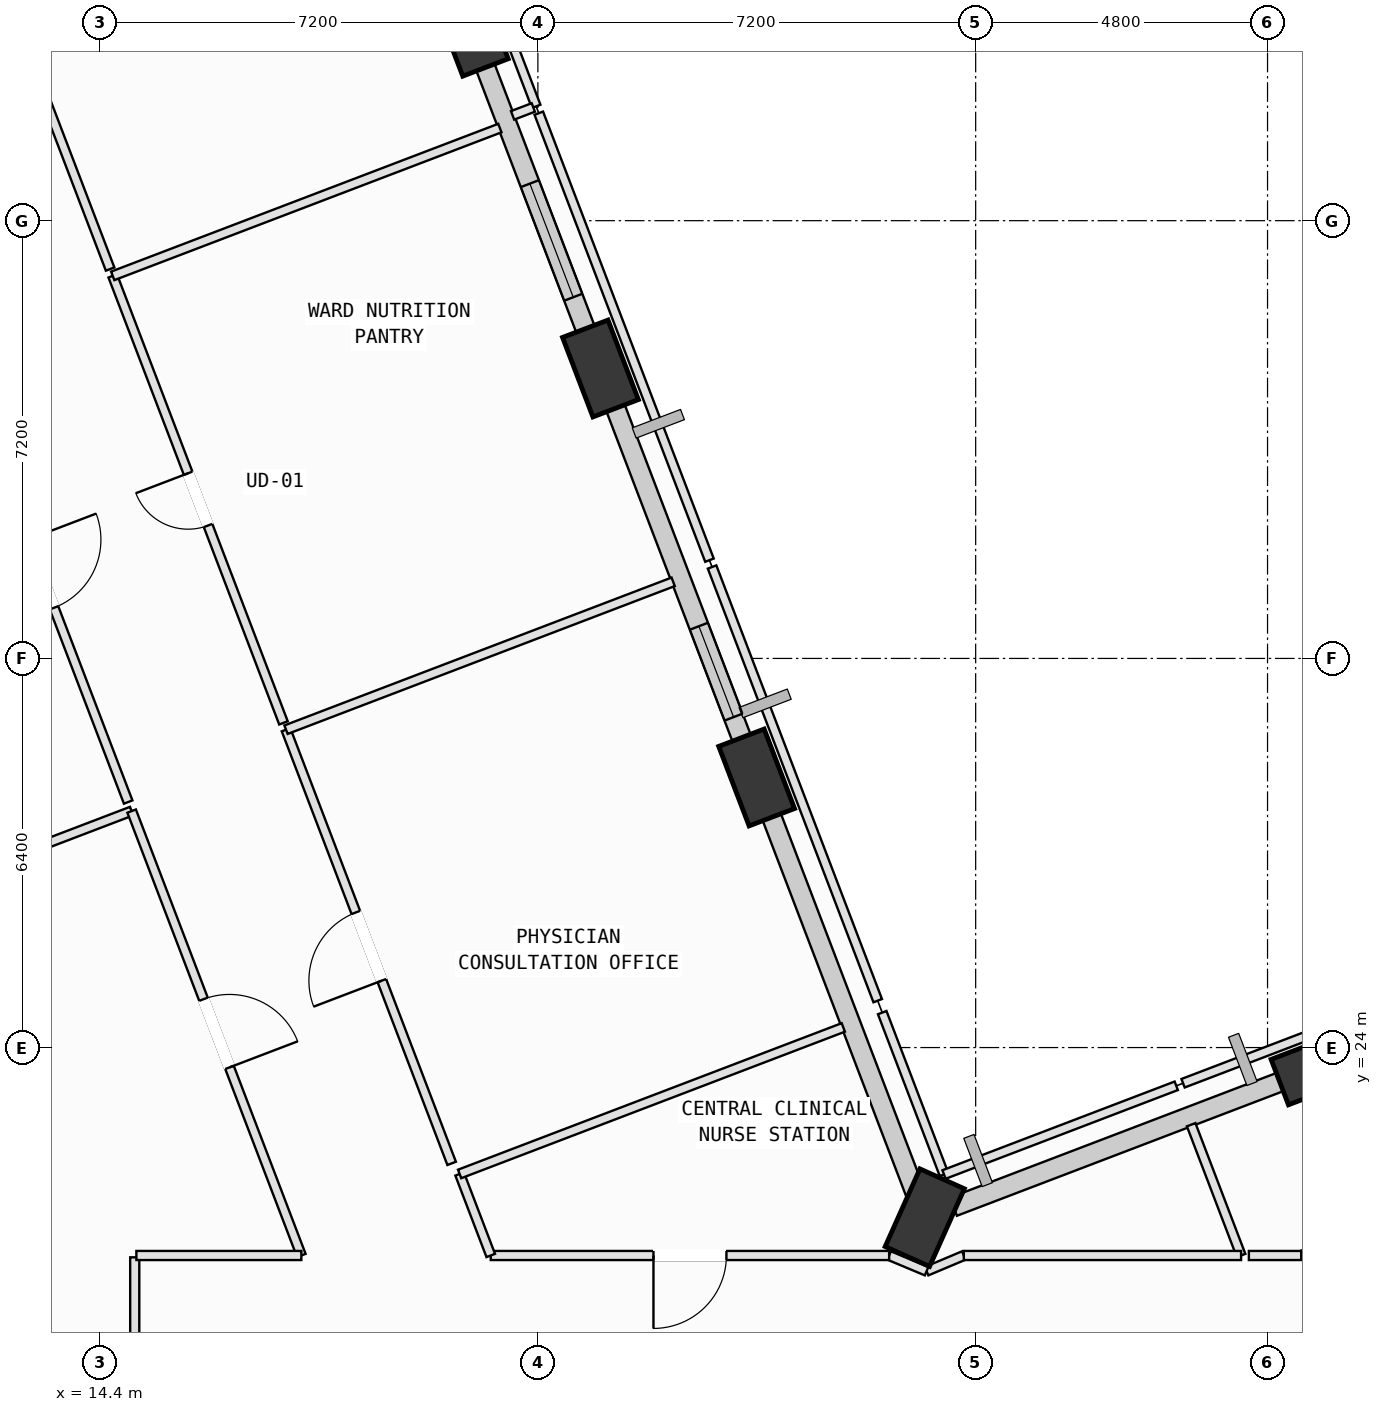
"""IFC4 building model, lengths in metres.
Left out: names, types, materials, properties, quantities, classifications, styles, units other than length and angle.
Written with IfcOpenShell. Run it as: python <this file> out.ifc"""

import sys

from ifc_helpers import new_model, si_unit, direction, frame, frame_2d, origin, origin_2d, place, context, subcontext, project, spatial, rectangle, extrude, element, fill, save


model = new_model("IFC4")
c1 = context("Model", 3, precision=1e-05, world=origin(), true_north=direction((0.0, 1.0)))
c2 = subcontext(c1, "Body", "Model", "MODEL_VIEW")
j1 = project(units=[si_unit("LENGTHUNIT", "METRE"), si_unit("PLANEANGLEUNIT", "RADIAN")], contexts=[c1])
p1 = place(None, origin())
s1 = spatial("IfcSite", under=j1, at=p1, CompositionType="ELEMENT")
p2 = place(p1, origin())
s2 = spatial("IfcBuilding", under=s1, at=p2, CompositionType="ELEMENT")
p3 = place(p2, frame((0.0, 0.0, 112.4)))
s3 = spatial("IfcBuildingStorey", under=s2, at=p3, CompositionType="ELEMENT", Elevation=112.4)
p4 = place(p3, frame((34.455, 23.682, 0.002), z_axis=(0.004581754657, 0.003543223601, 0.999983226405), x_axis=(-0.853691308844, 0.52077526819, 0.002066215567)))
e1 = element("IfcColumn", 1, at=p4, inside=s3, PredefinedType="COLUMN", context=c2, shape_type="SweptSolid", body=[
    extrude(rectangle(XDim=1.4, YDim=0.8, at=origin_2d()), origin(), (0.0, 0.0, 1.0), 3.996),
])
p5 = place(p3, frame((27.963, 21.202, 0.002), z_axis=(0.015083717876, -0.023205719809, 0.999616914634), x_axis=(-0.154931345932, 0.987602134532, 0.025264637642)))
e2 = element("IfcColumn", 2, at=p5, inside=s3, PredefinedType="COLUMN", context=c2, shape_type="SweptSolid", body=[
    extrude(rectangle(XDim=1.4, YDim=0.8, at=origin_2d()), origin(), (0.0, 0.0, 1.0), 3.998),
])
p6 = place(p3, frame((25.198, 28.442, 0.002), z_axis=(-0.014773412501, -0.034918975002, 0.999280947215), x_axis=(0.035197670554, 0.998752464752, 0.035420871532)))
e3 = element("IfcColumn", 3, at=p6, inside=s3, PredefinedType="COLUMN", context=c2, shape_type="SweptSolid", body=[
    extrude(rectangle(XDim=1.4, YDim=0.8, at=origin_2d()), origin(), (0.0, 0.0, 1.0), 3.999),
])
p7 = place(p3, frame((22.629, 35.168, 0.002), z_axis=(-0.042497434841, -0.045728947103, 0.998049513516), x_axis=(0.373403967299, 0.925833824237, 0.058319868861)))
e4 = element("IfcColumn", 4, at=p7, inside=s3, PredefinedType="COLUMN", context=c2, shape_type="SweptSolid", body=[
    extrude(rectangle(XDim=1.4, YDim=0.8, at=origin_2d()), origin(), (0.0, 0.0, 1.0), 4.004),
])
p8 = place(p3, frame((20.489, 40.774, 0.002), z_axis=(-0.065494174518, -0.054720504546, 0.996351433725), x_axis=(0.485566626564, 0.870556249889, 0.079729962663)))
e5 = element("IfcColumn", 5, at=p8, inside=s3, PredefinedType="COLUMN", context=c2, shape_type="SweptSolid", body=[
    extrude(rectangle(XDim=1.4, YDim=0.8, at=origin_2d()), origin(), (0.0, 0.0, 1.0), 4.011),
])
p9 = place(p3, frame((28.434, 21.382, 0.0), z_axis=(0.0, 0.0, 1.0), x_axis=(0.934206473055, 0.356732765109, 0.0)))
e6 = element("IfcWall", 6, at=p9, inside=s3, PredefinedType="SOLIDWALL", context=c2, shape_type="SweptSolid", body=[
    extrude(rectangle(XDim=5.96, YDim=0.32, at=frame_2d((2.98, 0.0))), origin(), (0.0, 0.0, 1.0), 3.165),
])
p10 = place(p3, frame((25.393, 27.93, 0.0), z_axis=(0.0, 0.0, 1.0), x_axis=(0.35674913221, -0.934200223008, 0.0)))
e7 = element("IfcWall", 7, at=p10, inside=s3, PredefinedType="SOLIDWALL", context=c2, shape_type="SweptSolid", body=[
    extrude(rectangle(XDim=6.76, YDim=0.32, at=frame_2d((3.38, 0.0))), origin(), (0.0, 0.0, 1.0), 3.165),
])
p11 = place(p3, frame((22.822, 34.665, 0.0), z_axis=(0.0, 0.0, 1.0), x_axis=(0.356719620657, -0.934211492243, 0.0)))
e8 = element("IfcWall", 8, at=p11, inside=s3, PredefinedType="SOLIDWALL", context=c2, shape_type="SweptSolid", body=[
    extrude(rectangle(XDim=6.223, YDim=0.32, at=frame_2d((3.111, 0.0))), origin(), (0.0, 0.0, 1.0), 3.165),
])
p12 = place(p11, frame((3.999, 0.0, 0.75)))
e9 = element("IfcOpeningElement", 9, at=p12, cuts=e8, PredefinedType="OPENING", context=c2, shape_type="SweptSolid", body=[
    extrude(rectangle(XDim=1.6, YDim=1.95, at=frame_2d((0.8, 0.975))), frame((0.0, 0.17, 0.0), z_axis=(0.0, -1.0, 0.0), x_axis=(1.0, 0.0, 0.0)), (0.0, 0.0, 1.0), 0.34),
])
p13 = place(p3, frame((20.676, 40.284, 0.0), z_axis=(0.0, 0.0, 1.0), x_axis=(0.356741479656, -0.934203145302, 0.0)))
e10 = element("IfcWall", 10, at=p13, inside=s3, PredefinedType="SOLIDWALL", context=c2, shape_type="SweptSolid", body=[
    extrude(rectangle(XDim=5.047, YDim=0.32, at=frame_2d((2.523, 0.0))), origin(), (0.0, 0.0, 1.0), 3.165),
])
p14 = place(p13, frame((2.221, 0.0, 0.75)))
e11 = element("IfcOpeningElement", 11, at=p14, cuts=e10, PredefinedType="OPENING", context=c2, shape_type="SweptSolid", body=[
    extrude(rectangle(XDim=2.0, YDim=1.95, at=frame_2d((1.0, 0.975))), frame((0.0, 0.17, 0.0), z_axis=(0.0, -1.0, 0.0), x_axis=(1.0, 0.0, 0.0)), (0.0, 0.0, 1.0), 0.34),
])
p15 = place(p3, frame((14.97, 20.55, 0.0), z_axis=(0.0, 0.0, 1.0), x_axis=(0.0, -1.0, 0.0)))
e12 = element("IfcWall", 12, at=p15, inside=s3, PredefinedType="PARTITIONING", context=c2, shape_type="SweptSolid", body=[
    extrude(rectangle(XDim=1.248, YDim=0.15, at=frame_2d((0.624, 0.0))), origin(), (0.0, 0.0, 1.0), 3.78),
])
p16 = place(p3, frame((4.675, 23.977, 0.0), z_axis=(0.0, 0.0, 1.0), x_axis=(0.934201387947, 0.356746081629, 0.0)))
e13 = element("IfcWall", 13, at=p16, inside=s3, PredefinedType="PARTITIONING", context=c2, shape_type="SweptSolid", body=[
    extrude(rectangle(XDim=10.965, YDim=0.15, at=frame_2d((5.483, 0.0))), origin(), (0.0, 0.0, 1.0), 3.78),
])
p17 = place(p3, frame((14.919, 27.889, 0.0), z_axis=(0.0, 0.0, 1.0), x_axis=(0.356742665593, -0.934202692431, 0.0)))
e14 = element("IfcWall", 14, at=p17, inside=s3, PredefinedType="PARTITIONING", context=c2, shape_type="SweptSolid", body=[
    extrude(rectangle(XDim=7.824, YDim=0.15, at=frame_2d((3.912, 0.0))), origin(), (0.0, 0.0, 1.0), 3.78),
])
p18 = place(p17, frame((3.312, 0.0, 0.0)))
e15 = element("IfcOpeningElement", 15, at=p18, cuts=e14, PredefinedType="OPENING", context=c2, shape_type="SweptSolid", body=[
    extrude(rectangle(XDim=1.2, YDim=2.15, at=frame_2d((0.6, 1.075))), frame((0.0, 0.085, 0.0), z_axis=(0.0, -1.0, 0.0), x_axis=(1.0, 0.0, 0.0)), (0.0, 0.0, 1.0), 0.17),
])
p19 = place(p3, frame((17.71, 20.58, 0.0), z_axis=(0.0, 0.0, 1.0), x_axis=(-1.0, 0.0, 0.0)))
e16 = element("IfcWall", 16, at=p19, inside=s3, PredefinedType="PARTITIONING", context=c2, shape_type="SweptSolid", body=[
    extrude(rectangle(XDim=2.713, YDim=0.15, at=frame_2d((1.356, 0.0))), origin(), (0.0, 0.0, 1.0), 3.78),
])
p20 = place(p3, frame((11.994, 35.549, 0.0), z_axis=(0.0, 0.0, 1.0), x_axis=(0.356737704726, -0.934204586815, 0.0)))
e17 = element("IfcWall", 17, at=p20, inside=s3, PredefinedType="PARTITIONING", context=c2, shape_type="SweptSolid", body=[
    extrude(rectangle(XDim=8.04, YDim=0.15, at=frame_2d((4.02, 0.0))), origin(), (0.0, 0.0, 1.0), 3.78),
])
p21 = place(p20, frame((3.42, 0.0, 0.0)))
e18 = element("IfcOpeningElement", 18, at=p21, cuts=e17, PredefinedType="OPENING", context=c2, shape_type="SweptSolid", body=[
    extrude(rectangle(XDim=1.2, YDim=2.15, at=frame_2d((0.6, 1.075))), frame((0.0, 0.085, 0.0), z_axis=(0.0, -1.0, 0.0), x_axis=(1.0, 0.0, 0.0)), (0.0, 0.0, 1.0), 0.17),
])
p22 = place(p3, frame((28.605, 20.58, 0.0), z_axis=(0.0, 0.0, 1.0), x_axis=(-0.921448466348, -0.388500609864, 0.0)))
e19 = element("IfcWall", 19, at=p22, inside=s3, PredefinedType="PARTITIONING", context=c2, shape_type="SweptSolid", body=[
    extrude(rectangle(XDim=0.664, YDim=0.15, at=frame_2d((0.332, 0.0))), origin(), (0.0, 0.0, 1.0), 3.78),
])
p23 = place(p3, frame((27.993, 20.322, 0.0), z_axis=(0.0, 0.0, 1.0), x_axis=(-0.922328906897, 0.386405729128, 0.0)))
e20 = element("IfcWall", 20, at=p23, inside=s3, PredefinedType="PARTITIONING", context=c2, shape_type="SweptSolid", body=[
    extrude(rectangle(XDim=0.668, YDim=0.15, at=frame_2d((0.334, 0.0))), origin(), (0.0, 0.0, 1.0), 3.78),
])
p24 = place(p3, frame((27.377, 20.58, 0.0), z_axis=(0.0, 0.0, 1.0), x_axis=(-1.0, 0.0, 0.0)))
e21 = element("IfcWall", 21, at=p24, inside=s3, PredefinedType="PARTITIONING", context=c2, shape_type="SweptSolid", body=[
    extrude(rectangle(XDim=6.552, YDim=0.15, at=frame_2d((3.276, 0.0))), origin(), (0.0, 0.0, 1.0), 3.78),
])
p25 = place(p24, frame((2.676, 0.0, 0.0)))
e22 = element("IfcOpeningElement", 22, at=p25, cuts=e21, PredefinedType="OPENING", context=c2, shape_type="SweptSolid", body=[
    extrude(rectangle(XDim=1.2, YDim=2.15, at=frame_2d((0.6, 1.075))), frame((0.0, 0.085, 0.0), z_axis=(0.0, -1.0, 0.0), x_axis=(1.0, 0.0, 0.0)), (0.0, 0.0, 1.0), 0.17),
])
p26 = place(p3, frame((20.825, 20.58, 0.0), z_axis=(0.0, 0.0, 1.0), x_axis=(-0.356709663508, 0.934215294223, 0.0)))
e23 = element("IfcWall", 23, at=p26, inside=s3, PredefinedType="PARTITIONING", context=c2, shape_type="SweptSolid", body=[
    extrude(rectangle(XDim=1.435, YDim=0.15, at=frame_2d((0.718, 0.0))), origin(), (0.0, 0.0, 1.0), 3.78),
])
p27 = place(p3, frame((20.313, 21.921, 0.0), z_axis=(0.0, 0.0, 1.0), x_axis=(0.93417589532, 0.356812831332, 0.0)))
e24 = element("IfcWall", 24, at=p27, inside=s3, PredefinedType="PARTITIONING", context=c2, shape_type="SweptSolid", body=[
    extrude(rectangle(XDim=6.755, YDim=0.15, at=frame_2d((3.377, 0.0))), origin(), (0.0, 0.0, 1.0), 3.78),
])
p28 = place(p3, frame((27.263, 24.575, 0.0), z_axis=(0.0, 0.0, 1.0), x_axis=(0.356814369835, -0.93417530768, 0.0)))
e25 = element("IfcWall", 25, at=p28, inside=s3, PredefinedType="PARTITIONING", context=c2, shape_type="SweptSolid", body=[
    extrude(rectangle(XDim=2.851, YDim=0.15, at=frame_2d((1.425, 0.0))), origin(), (0.0, 0.0, 1.0), 3.78),
])
p29 = place(p3, frame((28.28, 21.912, 0.0), z_axis=(0.0, 0.0, 1.0), x_axis=(0.934154329461, 0.356869288043, 0.0)))
e26 = element("IfcWall", 26, at=p29, inside=s3, PredefinedType="PARTITIONING", context=c2, shape_type="SweptSolid", body=[
    extrude(rectangle(XDim=4.088, YDim=0.15, at=frame_2d((2.044, 0.0))), origin(), (0.0, 0.0, 1.0), 3.78),
])
p30 = place(p3, frame((32.344, 22.731, 0.0), z_axis=(0.0, 0.0, 1.0), x_axis=(0.356625840628, -0.934247295846, 0.0)))
e27 = element("IfcWall", 27, at=p30, inside=s3, PredefinedType="PARTITIONING", context=c2, shape_type="SweptSolid", body=[
    extrude(rectangle(XDim=2.302, YDim=0.15, at=frame_2d((1.151, 0.0))), origin(), (0.0, 0.0, 1.0), 3.78),
])
p31 = place(p3, frame((33.165, 20.58, 0.0), z_axis=(0.0, 0.0, 1.0), x_axis=(-1.0, 0.0, 0.0)))
e28 = element("IfcWall", 28, at=p31, inside=s3, PredefinedType="PARTITIONING", context=c2, shape_type="SweptSolid", body=[
    extrude(rectangle(XDim=4.56, YDim=0.15, at=frame_2d((2.28, 0.0))), origin(), (0.0, 0.0, 1.0), 3.78),
])
p32 = place(p3, frame((32.211, 23.413, 0.0), z_axis=(0.0, 0.0, 1.0), x_axis=(0.934184043602, 0.356791497487, 0.0)))
e29 = element("IfcWall", 29, at=p32, inside=s3, PredefinedType="PARTITIONING", context=c2, shape_type="SweptSolid", body=[
    extrude(rectangle(XDim=5.686, YDim=0.15, at=frame_2d((2.843, 0.0))), origin(), (0.0, 0.0, 1.0), 3.78),
])
p33 = place(p3, frame((44.852, 24.665, 0.0), z_axis=(0.0, 0.0, 1.0), x_axis=(-0.934210506375, -0.35672220253, 0.0)))
e30 = element("IfcWall", 30, at=p33, inside=s3, PredefinedType="PARTITIONING", context=c2, shape_type="SweptSolid", body=[
    extrude(rectangle(XDim=11.451, YDim=0.15, at=frame_2d((5.726, 0.0))), origin(), (0.0, 0.0, 1.0), 2.945),
])
p34 = place(p33, frame((5.126, 0.0, 0.0)))
e31 = element("IfcOpeningElement", 31, at=p34, cuts=e30, PredefinedType="OPENING", context=c2, shape_type="SweptSolid", body=[
    extrude(rectangle(XDim=1.2, YDim=2.15, at=frame_2d((0.6, 1.075))), frame((0.0, 0.085, 0.0), z_axis=(0.0, -1.0, 0.0), x_axis=(1.0, 0.0, 0.0)), (0.0, 0.0, 1.0), 0.17),
])
p35 = place(p3, frame((34.154, 20.58, 0.0), z_axis=(0.0, 0.0, 1.0), x_axis=(-1.0, 0.0, 0.0)))
e32 = element("IfcWall", 32, at=p35, inside=s3, PredefinedType="PARTITIONING", context=c2, shape_type="SweptSolid", body=[
    extrude(rectangle(XDim=0.861, YDim=0.15, at=frame_2d((0.431, 0.0))), origin(), (0.0, 0.0, 1.0), 3.78),
])
p36 = place(p3, frame((20.182, 22.095, 0.0), z_axis=(0.0, 0.0, 1.0), x_axis=(-0.356741141549, 0.934203274414, 0.0)))
e33 = element("IfcWall", 33, at=p36, inside=s3, PredefinedType="PARTITIONING", context=c2, shape_type="SweptSolid", body=[
    extrude(rectangle(XDim=7.635, YDim=0.15, at=frame_2d((3.818, 0.0))), origin(), (0.0, 0.0, 1.0), 3.78),
])
p37 = place(p36, frame((3.218, 0.0, 0.0)))
e34 = element("IfcOpeningElement", 34, at=p37, cuts=e33, PredefinedType="OPENING", context=c2, shape_type="SweptSolid", body=[
    extrude(rectangle(XDim=1.2, YDim=2.15, at=frame_2d((0.6, 1.075))), frame((0.0, 0.085, 0.0), z_axis=(0.0, -1.0, 0.0), x_axis=(1.0, 0.0, 0.0)), (0.0, 0.0, 1.0), 0.17),
])
p38 = place(p3, frame((17.458, 29.228, 0.0), z_axis=(0.0, 0.0, 1.0), x_axis=(0.934175840808, 0.356812974051, 0.0)))
e35 = element("IfcWall", 35, at=p38, inside=s3, PredefinedType="PARTITIONING", context=c2, shape_type="SweptSolid", body=[
    extrude(rectangle(XDim=6.816, YDim=0.15, at=frame_2d((3.408, 0.0))), origin(), (0.0, 0.0, 1.0), 3.78),
])
p39 = place(p3, frame((24.465, 31.904, 0.0), z_axis=(0.0, 0.0, 1.0), x_axis=(0.356741141549, -0.934203274414, 0.0)))
e36 = element("IfcWall", 36, at=p39, inside=s3, PredefinedType="PARTITIONING", context=c2, shape_type="SweptSolid", body=[
    extrude(rectangle(XDim=7.635, YDim=0.15, at=frame_2d((3.818, 0.0))), origin(), (0.0, 0.0, 1.0), 3.78),
])
p40 = place(p3, frame((17.416, 29.34, 0.0), z_axis=(0.0, 0.0, 1.0), x_axis=(-0.356818232032, 0.93417383248, 0.0)))
e37 = element("IfcWall", 37, at=p40, inside=s3, PredefinedType="PARTITIONING", context=c2, shape_type="SweptSolid", body=[
    extrude(rectangle(XDim=7.87, YDim=0.15, at=frame_2d((3.935, 0.0))), origin(), (0.0, 0.0, 1.0), 3.78),
])
p41 = place(p40, frame((3.475, 0.0, 0.0)))
e38 = element("IfcOpeningElement", 38, at=p41, cuts=e37, PredefinedType="OPENING", context=c2, shape_type="SweptSolid", body=[
    extrude(rectangle(XDim=0.92, YDim=2.1, at=frame_2d((0.46, 1.05))), frame((0.0, 0.085, 0.0), z_axis=(0.0, -1.0, 0.0), x_axis=(1.0, 0.0, 0.0)), (0.0, 0.0, 1.0), 0.17),
])
p42 = place(p3, frame((14.608, 36.692, 0.0), z_axis=(0.0, 0.0, 1.0), x_axis=(0.934216215808, 0.356707249886, 0.0)))
e39 = element("IfcWall", 39, at=p42, inside=s3, PredefinedType="PARTITIONING", context=c2, shape_type="SweptSolid", body=[
    extrude(rectangle(XDim=6.815, YDim=0.15, at=frame_2d((3.408, 0.0))), origin(), (0.0, 0.0, 1.0), 3.78),
])
p43 = place(p3, frame((21.615, 39.368, 0.0), z_axis=(0.0, 0.0, 1.0), x_axis=(0.356709934664, -0.934215190688, 0.0)))
e40 = element("IfcWall", 40, at=p43, inside=s3, PredefinedType="PARTITIONING", context=c2, shape_type="SweptSolid", body=[
    extrude(rectangle(XDim=7.869, YDim=0.15, at=frame_2d((3.935, 0.0))), origin(), (0.0, 0.0, 1.0), 3.78),
])
p44 = place(p3, frame((19.255, 45.548, 0.0), z_axis=(0.0, 0.0, 1.0), x_axis=(0.356731387225, -0.934206999208, 0.0)))
e41 = element("IfcWall", 41, at=p44, inside=s3, PredefinedType="PARTITIONING", context=c2, shape_type="SweptSolid", body=[
    extrude(rectangle(XDim=6.495, YDim=0.15, at=frame_2d((3.248, 0.0))), origin(), (0.0, 0.0, 1.0), 3.78),
])
p45 = place(p3, frame((21.525, 39.462, 0.0), z_axis=(0.0, 0.0, 1.0), x_axis=(-0.934445312554, -0.356106666389, 0.0)))
e42 = element("IfcWall", 42, at=p45, inside=s3, PredefinedType="PARTITIONING", context=c2, shape_type="SweptSolid", body=[
    extrude(rectangle(XDim=0.365, YDim=0.15, at=frame_2d((0.182, 0.0))), origin(), (0.0, 0.0, 1.0), 3.78),
])
p46 = place(p3, frame((14.565, 36.804, 0.0), z_axis=(0.0, 0.0, 1.0), x_axis=(-0.356753501963, 0.93419855429, 0.0)))
e43 = element("IfcWall", 43, at=p46, inside=s3, PredefinedType="PARTITIONING", context=c2, shape_type="SweptSolid", body=[
    extrude(rectangle(XDim=7.31, YDim=0.15, at=frame_2d((3.655, 0.0))), origin(), (0.0, 0.0, 1.0), 3.78),
])
p47 = place(p46, frame((3.195, 0.0, 0.0)))
e44 = element("IfcOpeningElement", 44, at=p47, cuts=e43, PredefinedType="OPENING", context=c2, shape_type="SweptSolid", body=[
    extrude(rectangle(XDim=0.92, YDim=2.1, at=frame_2d((0.46, 1.05))), frame((0.0, 0.085, 0.0), z_axis=(0.0, -1.0, 0.0), x_axis=(1.0, 0.0, 0.0)), (0.0, 0.0, 1.0), 0.17),
])
p48 = place(p12, origin())
e45 = element("IfcWindow", 45, at=p48, inside=s3, PartitioningType="SINGLE_PANEL", PredefinedType="WINDOW", context=c2, shape_type="SweptSolid", body=[
    extrude(rectangle(XDim=1.6, YDim=1.95, at=frame_2d((0.8, 0.975))), frame((0.0, 0.03, 0.0), z_axis=(0.0, -1.0, 0.0), x_axis=(1.0, 0.0, 0.0)), (0.0, 0.0, 1.0), 0.06),
])
fill(e9, e45)
p49 = place(p14, origin())
e46 = element("IfcWindow", 46, at=p49, inside=s3, PartitioningType="SINGLE_PANEL", PredefinedType="WINDOW", context=c2, shape_type="SweptSolid", body=[
    extrude(rectangle(XDim=2.0, YDim=1.95, at=frame_2d((1.0, 0.975))), frame((0.0, 0.03, 0.0), z_axis=(0.0, -1.0, 0.0), x_axis=(1.0, 0.0, 0.0)), (0.0, 0.0, 1.0), 0.06),
])
fill(e11, e46)
p50 = place(p18, origin())
e47 = element("IfcDoor", 47, at=p50, inside=s3, OperationType="SINGLE_SWING_RIGHT", PredefinedType="DOOR", context=c2, shape_type="SweptSolid", body=[
    extrude(rectangle(XDim=1.2, YDim=2.15, at=frame_2d((0.6, 1.075))), frame((0.0, 0.025, 0.0), z_axis=(0.0, -1.0, 0.0), x_axis=(1.0, 0.0, 0.0)), (0.0, 0.0, 1.0), 0.05),
])
fill(e15, e47)
p51 = place(p21, origin())
e48 = element("IfcDoor", 48, at=p51, inside=s3, OperationType="SINGLE_SWING_LEFT", PredefinedType="DOOR", context=c2, shape_type="SweptSolid", body=[
    extrude(rectangle(XDim=1.2, YDim=2.15, at=frame_2d((0.6, 1.075))), frame((0.0, 0.025, 0.0), z_axis=(0.0, -1.0, 0.0), x_axis=(1.0, 0.0, 0.0)), (0.0, 0.0, 1.0), 0.05),
])
fill(e18, e48)
p52 = place(p25, origin())
e49 = element("IfcDoor", 49, at=p52, inside=s3, OperationType="SINGLE_SWING_RIGHT", PredefinedType="DOOR", context=c2, shape_type="SweptSolid", body=[
    extrude(rectangle(XDim=1.2, YDim=2.15, at=frame_2d((0.6, 1.075))), frame((0.0, 0.025, 0.0), z_axis=(0.0, -1.0, 0.0), x_axis=(1.0, 0.0, 0.0)), (0.0, 0.0, 1.0), 0.05),
])
fill(e22, e49)
p53 = place(p37, origin())
e50 = element("IfcDoor", 50, at=p53, inside=s3, OperationType="SINGLE_SWING_LEFT", PredefinedType="DOOR", context=c2, shape_type="SweptSolid", body=[
    extrude(rectangle(XDim=1.2, YDim=2.15, at=frame_2d((0.6, 1.075))), frame((0.0, 0.025, 0.0), z_axis=(0.0, -1.0, 0.0), x_axis=(1.0, 0.0, 0.0)), (0.0, 0.0, 1.0), 0.05),
])
fill(e34, e50)
p54 = place(p41, origin())
e51 = element("IfcDoor", 51, at=p54, inside=s3, OperationType="SINGLE_SWING_RIGHT", PredefinedType="DOOR", context=c2, shape_type="SweptSolid", body=[
    extrude(rectangle(XDim=0.92, YDim=2.1, at=frame_2d((0.46, 1.05))), frame((0.0, 0.025, 0.0), z_axis=(0.0, -1.0, 0.0), x_axis=(1.0, 0.0, 0.0)), (0.0, 0.0, 1.0), 0.05),
])
fill(e38, e51)
save(model, sys.argv[1])
